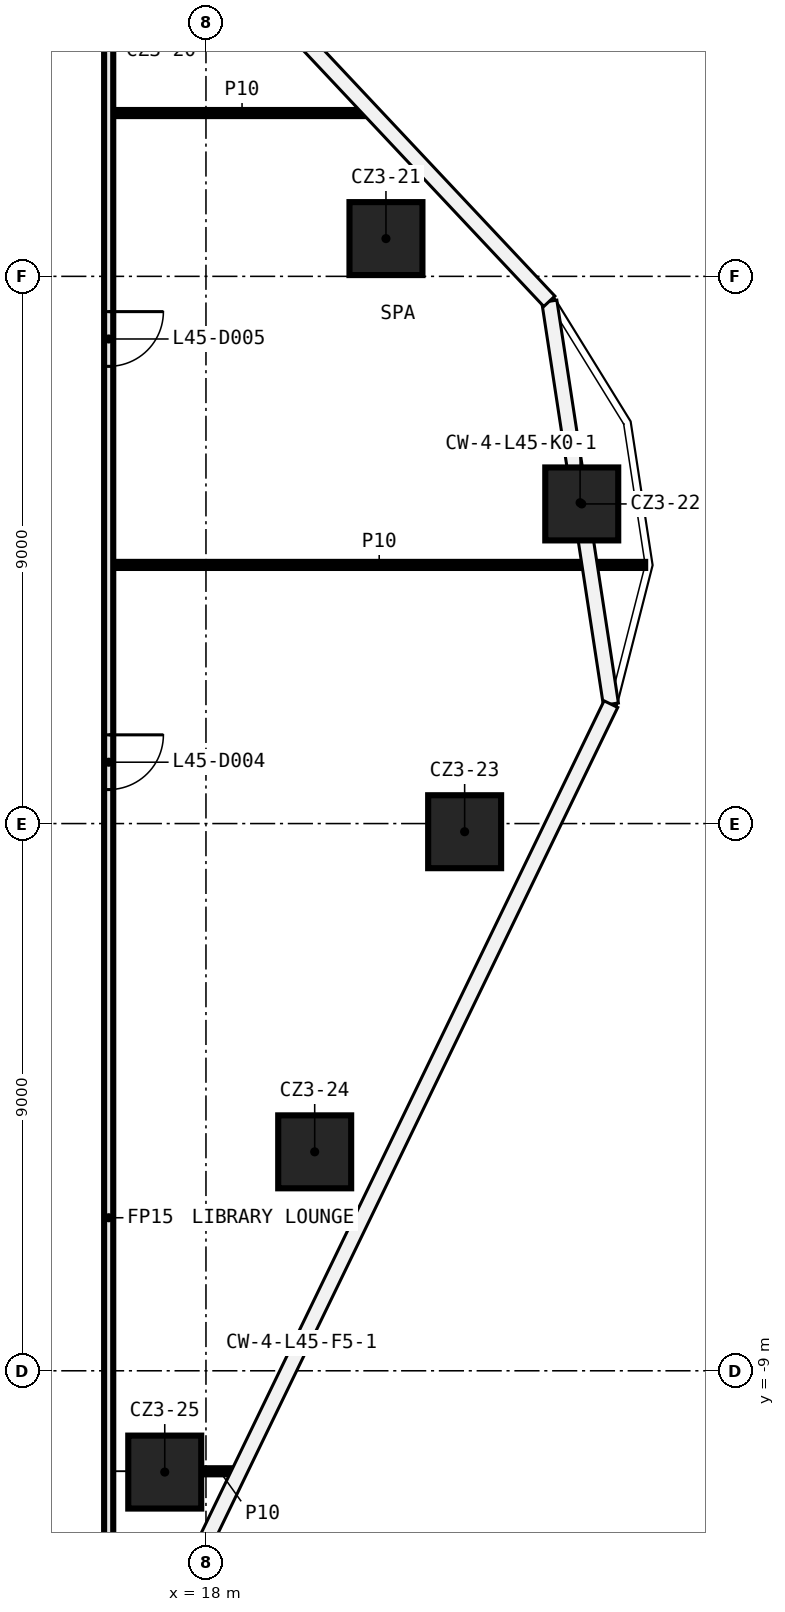
"""IFC4 building model, lengths in metres.
Left out: names, types, materials, properties, quantities, classifications, styles, units other than length and angle.
Written with IfcOpenShell. Run it as: python <this file> out.ifc"""

import sys

from ifc_helpers import new_model, si_unit, direction, frame, frame_2d, origin, origin_2d, place, context, subcontext, project, spatial, rectangle, extrude, element, fill, save


model = new_model("IFC4")
c1 = context("Model", 3, precision=1e-05, world=origin(), true_north=direction((0.0, 1.0)))
c2 = subcontext(c1, "Body", "Model", "MODEL_VIEW")
j1 = project(units=[si_unit("LENGTHUNIT", "METRE"), si_unit("PLANEANGLEUNIT", "RADIAN")], contexts=[c1])
p1 = place(None, origin())
s1 = spatial("IfcSite", under=j1, at=p1, CompositionType="ELEMENT")
p2 = place(p1, origin())
s2 = spatial("IfcBuilding", under=s1, at=p2, CompositionType="ELEMENT")
p3 = place(p2, frame((0.0, 0.0, 215.6)))
s3 = spatial("IfcBuildingStorey", under=s2, at=p3, CompositionType="ELEMENT", Elevation=215.6)
for number, where, z_axis, x_axis in (
    (1, (20.96, 9.621, 0.0), (0.0, 0.0, 1.0), (1.0, 0.0, 0.0)),
    (2, (24.18, 5.257, 0.0), (0.0, 0.0, 1.0), (1.0, 0.0, 0.0)),
    (3, (22.254, -0.134, 0.0), (0.0, 0.0, 1.0), (1.0, 0.0, 0.0)),
    (4, (19.788, -5.399, 0.0), (0.0, 0.0, 1.0), (1.0, 0.0, 0.0)),
    (5, (17.322, -10.666, 0.0), (0.0, 0.0, 1.0), (1.0, 0.0, 0.0)),
):
    element("IfcColumn", number, at=place(p3, frame(where, z_axis=z_axis, x_axis=x_axis)), inside=s3, PredefinedType="COLUMN", context=c2, shape_type="SweptSolid", body=[
        extrude(rectangle(XDim=1.2, YDim=1.2, at=origin_2d()), origin(), (0.0, 0.0, 1.0), 4.4),
    ])
p4 = place(p3, frame((17.922, -10.653, 0.0), z_axis=(0.0, 0.0, 1.0), x_axis=(1.0, 0.0, 0.0)))
e6 = element("IfcWall", 6, at=p4, inside=s3, PredefinedType="PARTITIONING", context=c2, shape_type="SweptSolid", body=[
    extrude(rectangle(XDim=0.608, YDim=0.1, at=frame_2d((0.304, 0.0))), origin(), (0.0, 0.0, 1.0), 4.4),
])
p5 = place(p3, frame((16.475, 4.254, 0.0), z_axis=(0.0, 0.0, 1.0), x_axis=(1.0, 0.0, 0.0)))
e7 = element("IfcWall", 7, at=p5, inside=s3, PredefinedType="PARTITIONING", context=c2, shape_type="SweptSolid", body=[
    extrude(rectangle(XDim=8.748, YDim=0.1, at=frame_2d((4.374, 0.0))), origin(), (0.0, 0.0, 1.0), 4.4),
])
p6 = place(p3, frame((16.475, 11.686, 0.0), z_axis=(0.0, 0.0, 1.0), x_axis=(1.0, 0.0, 0.0)))
e8 = element("IfcWall", 8, at=p6, inside=s3, PredefinedType="PARTITIONING", context=c2, shape_type="SweptSolid", body=[
    extrude(rectangle(XDim=4.237, YDim=0.1, at=frame_2d((2.118, 0.0))), origin(), (0.0, 0.0, 1.0), 4.4),
])
p7 = place(p3, frame((16.4, 13.325, 0.0), z_axis=(0.0, 0.0, 1.0), x_axis=(0.0, -1.0, 0.0)))
e9 = element("IfcWall", 9, at=p7, inside=s3, PredefinedType="PARTITIONING", context=c2, shape_type="SweptSolid", body=[
    extrude(rectangle(XDim=26.65, YDim=0.15, at=frame_2d((13.325, 0.0))), origin(), (0.0, 0.0, 1.0), 4.4),
])
p8 = place(p7, frame((11.866, 0.0, 0.0)))
e10 = element("IfcOpeningElement", 10, at=p8, cuts=e9, PredefinedType="OPENING", context=c2, shape_type="SweptSolid", body=[
    extrude(rectangle(XDim=0.9, YDim=2.1, at=frame_2d((0.45, 1.05))), frame((0.0, 0.085, 0.0), z_axis=(0.0, -1.0, 0.0), x_axis=(1.0, 0.0, 0.0)), (0.0, 0.0, 1.0), 0.17),
])
p9 = place(p7, frame((4.905, 0.0, 0.0)))
e11 = element("IfcOpeningElement", 11, at=p9, cuts=e9, PredefinedType="OPENING", context=c2, shape_type="SweptSolid", body=[
    extrude(rectangle(XDim=0.9, YDim=2.1, at=frame_2d((0.45, 1.05))), frame((0.0, 0.085, 0.0), z_axis=(0.0, -1.0, 0.0), x_axis=(1.0, 0.0, 0.0)), (0.0, 0.0, 1.0), 0.17),
])
p10 = place(p8, origin())
e12 = element("IfcDoor", 12, at=p10, inside=s3, OperationType="SINGLE_SWING_LEFT", PredefinedType="DOOR", context=c2, shape_type="SweptSolid", body=[
    extrude(rectangle(XDim=0.9, YDim=2.1, at=frame_2d((0.45, 1.05))), frame((0.0, 0.025, 0.0), z_axis=(0.0, -1.0, 0.0), x_axis=(1.0, 0.0, 0.0)), (0.0, 0.0, 1.0), 0.05),
])
fill(e10, e12)
p11 = place(p9, origin())
e13 = element("IfcDoor", 13, at=p11, inside=s3, OperationType="SINGLE_SWING_RIGHT", PredefinedType="DOOR", context=c2, shape_type="SweptSolid", body=[
    extrude(rectangle(XDim=0.9, YDim=2.1, at=frame_2d((0.45, 1.05))), frame((0.0, 0.025, 0.0), z_axis=(0.0, -1.0, 0.0), x_axis=(1.0, 0.0, 0.0)), (0.0, 0.0, 1.0), 0.05),
])
fill(e11, e13)
save(model, sys.argv[1])
